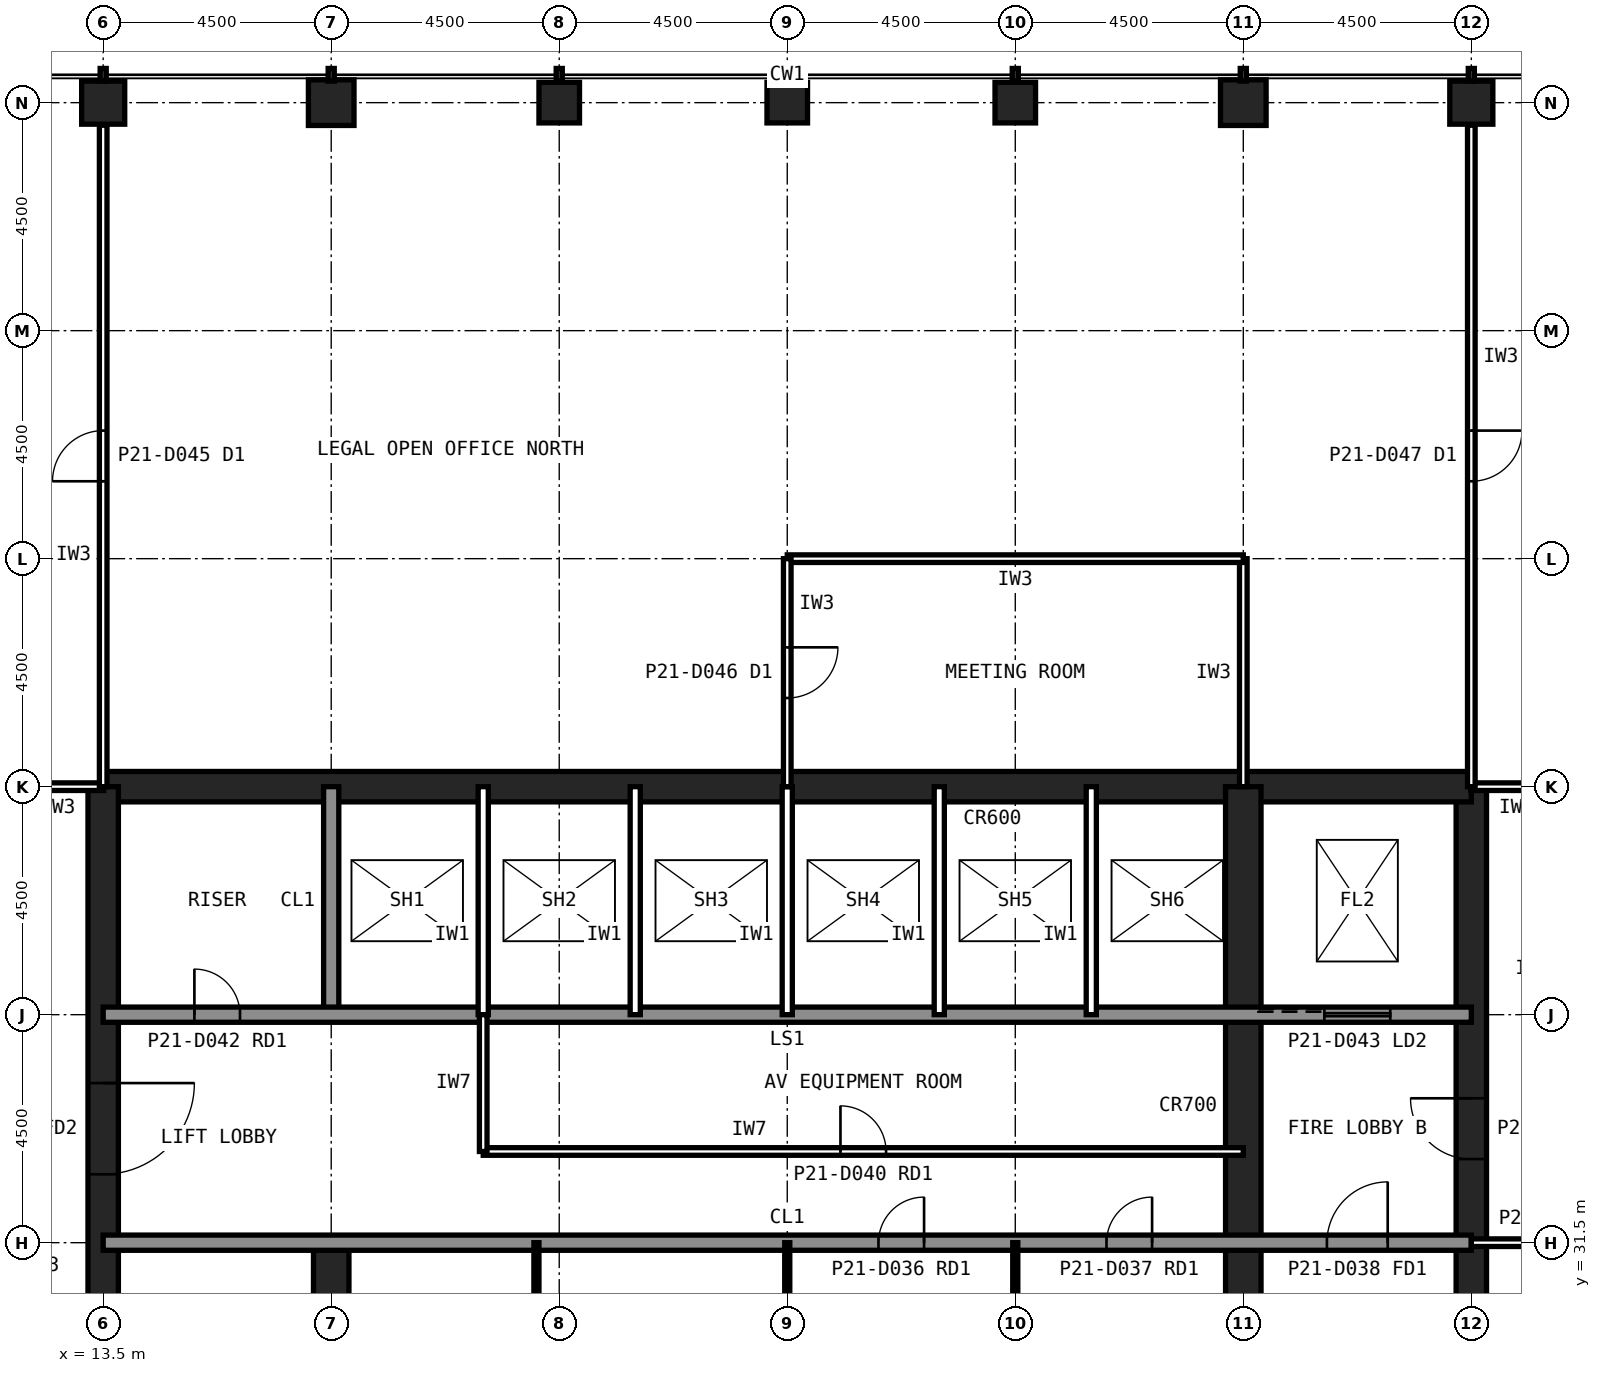
"""IFC4 building model, lengths in metres.
Left out: names, types, materials, properties, quantities, classifications, styles, units other than length and angle.
Written with IfcOpenShell. Run it as: python <this file> out.ifc"""

import sys

from ifc_helpers import new_model, si_unit, direction, frame, frame_2d, origin, origin_2d, place, context, subcontext, project, spatial, rectangle, hollow_rectangle, extrude, element, fill, save


model = new_model("IFC4")
c1 = context("Model", 3, precision=1e-05, world=origin(), true_north=direction((0.0, 1.0)))
c2 = subcontext(c1, "Body", "Model", "MODEL_VIEW")
j1 = project(units=[si_unit("LENGTHUNIT", "METRE"), si_unit("PLANEANGLEUNIT", "RADIAN")], contexts=[c1])
p1 = place(None, origin())
s1 = spatial("IfcSite", under=j1, at=p1, CompositionType="ELEMENT")
p2 = place(p1, origin())
s2 = spatial("IfcBuilding", under=s1, at=p2, CompositionType="ELEMENT")
p3 = place(p2, frame((0.0, 0.0, 87.8)))
s3 = spatial("IfcBuildingStorey", under=s2, at=p3, CompositionType="ELEMENT", Elevation=87.8)
p4 = place(p3, frame((40.5, 54.0, 0.0), z_axis=(0.0, 0.0, 1.0), x_axis=(1.0, 0.0, 0.0)))
e1 = element("IfcColumn", 1, at=p4, inside=s3, PredefinedType="COLUMN", context=c2, shape_type="SweptSolid", body=[
    extrude(hollow_rectangle(XDim=0.85, YDim=0.85, WallThickness=0.05, at=origin_2d()), origin(), (0.0, 0.0, 1.0), 4.2),
])
p5 = place(p3, frame((36.0, 54.0, 0.0), z_axis=(0.0, 0.0, 1.0), x_axis=(1.0, 0.0, 0.0)))
e2 = element("IfcColumn", 2, at=p5, inside=s3, PredefinedType="COLUMN", context=c2, shape_type="SweptSolid", body=[
    extrude(hollow_rectangle(XDim=0.9, YDim=0.9, WallThickness=0.063, at=origin_2d()), origin(), (0.0, 0.0, 1.0), 4.2),
])
for number, where, z_axis, x_axis in (
    (3, (31.5, 54.0, 0.0), (0.0, 0.0, 1.0), (1.0, 0.0, 0.0)),
    (4, (27.0, 54.0, 0.0), (0.0, 0.0, 1.0), (1.0, 0.0, 0.0)),
    (5, (22.5, 54.0, 0.0), (0.0, 0.0, 1.0), (1.0, 0.0, 0.0)),
):
    element("IfcColumn", number, at=place(p3, frame(where, z_axis=z_axis, x_axis=x_axis)), inside=s3, PredefinedType="COLUMN", context=c2, shape_type="SweptSolid", body=[
        extrude(hollow_rectangle(XDim=0.8, YDim=0.8, WallThickness=0.045, at=origin_2d()), origin(), (0.0, 0.0, 1.0), 4.2),
    ])
p6 = place(p3, frame((18.0, 54.0, 0.0), z_axis=(0.0, 0.0, 1.0), x_axis=(1.0, 0.0, 0.0)))
e6 = element("IfcColumn", 6, at=p6, inside=s3, PredefinedType="COLUMN", context=c2, shape_type="SweptSolid", body=[
    extrude(hollow_rectangle(XDim=0.9, YDim=0.9, WallThickness=0.063, at=origin_2d()), origin(), (0.0, 0.0, 1.0), 4.2),
])
p7 = place(p3, frame((13.5, 54.0, 0.0), z_axis=(0.0, 0.0, 1.0), x_axis=(1.0, 0.0, 0.0)))
e7 = element("IfcColumn", 7, at=p7, inside=s3, PredefinedType="COLUMN", context=c2, shape_type="SweptSolid", body=[
    extrude(hollow_rectangle(XDim=0.85, YDim=0.85, WallThickness=0.05, at=origin_2d()), origin(), (0.0, 0.0, 1.0), 4.2),
])
p8 = place(p3, frame((40.5, 13.5, 0.0), z_axis=(0.0, 0.0, 1.0), x_axis=(0.0, 1.0, 0.0)))
e8 = element("IfcWall", 8, at=p8, inside=s3, PredefinedType="SHEAR", context=c2, shape_type="SweptSolid", body=[
    extrude(rectangle(XDim=27.0, YDim=0.6, at=frame_2d((13.5, 0.0))), origin(), (0.0, 0.0, 1.0), 4.2),
])
p9 = place(p8, frame((5.85, 0.0, 0.0)))
e9 = element("IfcOpeningElement", 9, at=p9, cuts=e8, PredefinedType="OPENING", context=c2, shape_type="SweptSolid", body=[
    extrude(rectangle(XDim=1.8, YDim=2.1, at=frame_2d((0.9, 1.05))), frame((0.0, 0.31, 0.0), z_axis=(0.0, -1.0, 0.0), x_axis=(1.0, 0.0, 0.0)), (0.0, 0.0, 1.0), 0.62),
])
p10 = place(p8, frame((19.65, 0.0, 0.0)))
e10 = element("IfcOpeningElement", 10, at=p10, cuts=e8, PredefinedType="OPENING", context=c2, shape_type="SweptSolid", body=[
    extrude(rectangle(XDim=1.2, YDim=2.1, at=frame_2d((0.6, 1.05))), frame((0.0, 0.31, 0.0), z_axis=(0.0, -1.0, 0.0), x_axis=(1.0, 0.0, 0.0)), (0.0, 0.0, 1.0), 0.62),
])
p11 = place(p3, frame((40.5, 40.5, 0.0), z_axis=(0.0, 0.0, 1.0), x_axis=(-1.0, 0.0, 0.0)))
e11 = element("IfcWall", 11, at=p11, inside=s3, PredefinedType="SHEAR", context=c2, shape_type="SweptSolid", body=[
    extrude(rectangle(XDim=27.0, YDim=0.6, at=frame_2d((13.5, 0.0))), origin(), (0.0, 0.0, 1.0), 4.2),
])
p12 = place(p3, frame((13.5, 40.5, 0.0), z_axis=(0.0, 0.0, 1.0), x_axis=(0.0, -1.0, 0.0)))
e12 = element("IfcWall", 12, at=p12, inside=s3, PredefinedType="SHEAR", context=c2, shape_type="SweptSolid", body=[
    extrude(rectangle(XDim=27.0, YDim=0.6, at=frame_2d((13.5, 0.0))), origin(), (0.0, 0.0, 1.0), 4.2),
])
p13 = place(p12, frame((19.65, 0.0, 0.0)))
e13 = element("IfcOpeningElement", 13, at=p13, cuts=e12, PredefinedType="OPENING", context=c2, shape_type="SweptSolid", body=[
    extrude(rectangle(XDim=1.2, YDim=2.1, at=frame_2d((0.6, 1.05))), frame((0.0, 0.31, 0.0), z_axis=(0.0, -1.0, 0.0), x_axis=(1.0, 0.0, 0.0)), (0.0, 0.0, 1.0), 0.62),
])
p14 = place(p12, frame((5.85, 0.0, 0.0)))
e14 = element("IfcOpeningElement", 14, at=p14, cuts=e12, PredefinedType="OPENING", context=c2, shape_type="SweptSolid", body=[
    extrude(rectangle(XDim=1.8, YDim=2.1, at=frame_2d((0.9, 1.05))), frame((0.0, 0.31, 0.0), z_axis=(0.0, -1.0, 0.0), x_axis=(1.0, 0.0, 0.0)), (0.0, 0.0, 1.0), 0.62),
])
p15 = place(p3, frame((18.0, 13.5, 0.0), z_axis=(0.0, 0.0, 1.0), x_axis=(0.0, 1.0, 0.0)))
e15 = element("IfcWall", 15, at=p15, inside=s3, PredefinedType="SHEAR", context=c2, shape_type="SweptSolid", body=[
    extrude(rectangle(XDim=18.0, YDim=0.7, at=frame_2d((9.0, 0.0))), origin(), (0.0, 0.0, 1.0), 4.2),
])
p16 = place(p3, frame((18.0, 36.0, 0.0), z_axis=(0.0, 0.0, 1.0), x_axis=(0.0, 1.0, 0.0)))
e16 = element("IfcWall", 16, at=p16, inside=s3, PredefinedType="SOLIDWALL", context=c2, shape_type="SweptSolid", body=[
    extrude(rectangle(XDim=4.5, YDim=0.3, at=frame_2d((2.25, 0.0))), origin(), (0.0, 0.0, 1.0), 4.04),
])
p17 = place(p3, frame((36.0, 22.5, 0.0), z_axis=(0.0, 0.0, 1.0), x_axis=(0.0, 1.0, 0.0)))
e17 = element("IfcWall", 17, at=p17, inside=s3, PredefinedType="SHEAR", context=c2, shape_type="SweptSolid", body=[
    extrude(rectangle(XDim=18.0, YDim=0.7, at=frame_2d((9.0, 0.0))), origin(), (0.0, 0.0, 1.0), 4.2),
])
p18 = place(p3, frame((13.5, 36.0, 0.0), z_axis=(0.0, 0.0, 1.0), x_axis=(1.0, 0.0, 0.0)))
e18 = element("IfcWall", 18, at=p18, inside=s3, PredefinedType="SOLIDWALL", context=c2, shape_type="SweptSolid", body=[
    extrude(rectangle(XDim=27.0, YDim=0.3, at=frame_2d((13.5, 0.0))), origin(), (0.0, 0.0, 1.0), 4.04),
])
p19 = place(p18, frame((1.8, 0.0, 0.0)))
e19 = element("IfcOpeningElement", 19, at=p19, cuts=e18, PredefinedType="OPENING", context=c2, shape_type="SweptSolid", body=[
    extrude(rectangle(XDim=0.9, YDim=2.1, at=frame_2d((0.45, 1.05))), frame((0.0, 0.16, 0.0), z_axis=(0.0, -1.0, 0.0), x_axis=(1.0, 0.0, 0.0)), (0.0, 0.0, 1.0), 0.32),
])
p20 = place(p18, frame((24.1, 0.0, 0.0)))
e20 = element("IfcOpeningElement", 20, at=p20, cuts=e18, PredefinedType="OPENING", context=c2, shape_type="SweptSolid", body=[
    extrude(rectangle(XDim=1.3, YDim=2.2, at=frame_2d((0.65, 1.1))), frame((0.0, 0.16, 0.0), z_axis=(0.0, -1.0, 0.0), x_axis=(1.0, 0.0, 0.0)), (0.0, 0.0, 1.0), 0.32),
])
p21 = place(p3, frame((13.5, 31.5, 0.0), z_axis=(0.0, 0.0, 1.0), x_axis=(1.0, 0.0, 0.0)))
e21 = element("IfcWall", 21, at=p21, inside=s3, PredefinedType="SOLIDWALL", context=c2, shape_type="SweptSolid", body=[
    extrude(rectangle(XDim=27.0, YDim=0.3, at=frame_2d((13.5, 0.0))), origin(), (0.0, 0.0, 1.0), 4.04),
])
p22 = place(p21, frame((24.15, 0.0, 0.0)))
e22 = element("IfcOpeningElement", 22, at=p22, cuts=e21, PredefinedType="OPENING", context=c2, shape_type="SweptSolid", body=[
    extrude(rectangle(XDim=1.2, YDim=2.1, at=frame_2d((0.6, 1.05))), frame((0.0, 0.16, 0.0), z_axis=(0.0, -1.0, 0.0), x_axis=(1.0, 0.0, 0.0)), (0.0, 0.0, 1.0), 0.32),
])
p23 = place(p21, frame((15.3, 0.0, 0.0)))
e23 = element("IfcOpeningElement", 23, at=p23, cuts=e21, PredefinedType="OPENING", context=c2, shape_type="SweptSolid", body=[
    extrude(rectangle(XDim=0.9, YDim=2.1, at=frame_2d((0.45, 1.05))), frame((0.0, 0.16, 0.0), z_axis=(0.0, -1.0, 0.0), x_axis=(1.0, 0.0, 0.0)), (0.0, 0.0, 1.0), 0.32),
])
p24 = place(p21, frame((19.8, 0.0, 0.0)))
e24 = element("IfcOpeningElement", 24, at=p24, cuts=e21, PredefinedType="OPENING", context=c2, shape_type="SweptSolid", body=[
    extrude(rectangle(XDim=0.9, YDim=2.1, at=frame_2d((0.45, 1.05))), frame((0.0, 0.16, 0.0), z_axis=(0.0, -1.0, 0.0), x_axis=(1.0, 0.0, 0.0)), (0.0, 0.0, 1.0), 0.32),
])
for number, where, z_axis, x_axis in (
    (25, (21.0, 36.0, 0.0), (0.0, 0.0, 1.0), (0.0, 1.0, 0.0)),
    (26, (24.0, 36.0, 0.0), (0.0, 0.0, 1.0), (0.0, 1.0, 0.0)),
    (27, (27.0, 36.0, 0.0), (0.0, 0.0, 1.0), (0.0, 1.0, 0.0)),
    (28, (30.0, 36.0, 0.0), (0.0, 0.0, 1.0), (0.0, 1.0, 0.0)),
    (29, (33.0, 36.0, 0.0), (0.0, 0.0, 1.0), (0.0, 1.0, 0.0)),
):
    element("IfcWall", number, at=place(p3, frame(where, z_axis=z_axis, x_axis=x_axis)), inside=s3, PredefinedType="PARTITIONING", context=c2, shape_type="SweptSolid", body=[
        extrude(rectangle(XDim=4.5, YDim=0.2, at=frame_2d((2.25, 0.0))), origin(), (0.0, 0.0, 1.0), 4.04),
    ])
for number, where, z_axis, x_axis in (
    (30, (22.05, 22.5, 0.0), (0.0, 0.0, 1.0), (0.0, 1.0, 0.0)),
    (31, (27.0, 22.5, 0.0), (0.0, 0.0, 1.0), (0.0, 1.0, 0.0)),
    (32, (31.5, 22.5, 0.0), (0.0, 0.0, 1.0), (0.0, 1.0, 0.0)),
):
    element("IfcWall", number, at=place(p3, frame(where, z_axis=z_axis, x_axis=x_axis)), inside=s3, PredefinedType="PLUMBINGWALL", context=c2, shape_type="SweptSolid", body=[
        extrude(rectangle(XDim=9.0, YDim=0.1, at=frame_2d((4.5, 0.0))), origin(), (0.0, 0.0, 1.0), 4.04),
    ])
p25 = place(p3, frame((18.0, 33.3, 0.0), z_axis=(0.0, 0.0, 1.0), x_axis=(1.0, 0.0, 0.0)))
e33 = element("IfcWall", 33, at=p25, inside=s3, PredefinedType="PARTITIONING", context=c2, shape_type="SweptSolid", body=[
    extrude(rectangle(XDim=12.0, YDim=0.15, at=frame_2d((6.0, 0.0))), origin(), (0.0, 0.0, 1.0), 4.04),
])
p26 = place(p25, frame((2.55, 0.0, 0.0)))
e34 = element("IfcOpeningElement", 34, at=p26, cuts=e33, PredefinedType="OPENING", context=c2, shape_type="SweptSolid", body=[
    extrude(rectangle(XDim=0.9, YDim=2.1, at=frame_2d((0.45, 1.05))), frame((0.0, 0.085, 0.0), z_axis=(0.0, -1.0, 0.0), x_axis=(1.0, 0.0, 0.0)), (0.0, 0.0, 1.0), 0.17),
])
p27 = place(p25, frame((8.55, 0.0, 0.0)))
e35 = element("IfcOpeningElement", 35, at=p27, cuts=e33, PredefinedType="OPENING", context=c2, shape_type="SweptSolid", body=[
    extrude(rectangle(XDim=0.9, YDim=2.1, at=frame_2d((0.45, 1.05))), frame((0.0, 0.085, 0.0), z_axis=(0.0, -1.0, 0.0), x_axis=(1.0, 0.0, 0.0)), (0.0, 0.0, 1.0), 0.17),
])
for number, where, z_axis, x_axis in (
    (36, (18.0, 33.3, 0.0), (0.0, 0.0, 1.0), (0.0, 1.0, 0.0)),
    (37, (24.0, 33.3, 0.0), (0.0, 0.0, 1.0), (0.0, 1.0, 0.0)),
    (38, (30.0, 33.3, 0.0), (0.0, 0.0, 1.0), (0.0, 1.0, 0.0)),
):
    element("IfcWall", number, at=place(p3, frame(where, z_axis=z_axis, x_axis=x_axis)), inside=s3, PredefinedType="PARTITIONING", context=c2, shape_type="SweptSolid", body=[
        extrude(rectangle(XDim=2.7, YDim=0.15, at=frame_2d((1.35, 0.0))), origin(), (0.0, 0.0, 1.0), 4.04),
    ])
for number, where, z_axis, x_axis in (
    (39, (13.51, 40.5, 0.0), (0.0, 0.0, 1.0), (-1.0, 0.0, 0.0)),
    (40, (42.3, 40.5, 0.0), (0.0, 0.0, 1.0), (-1.0, 0.0, 0.0)),
):
    element("IfcWall", number, at=place(p3, frame(where, z_axis=z_axis, x_axis=x_axis)), inside=s3, PredefinedType="PARTITIONING", context=c2, shape_type="SweptSolid", body=[
        extrude(rectangle(XDim=1.81, YDim=0.15, at=frame_2d((0.905, 0.0))), origin(), (0.0, 0.0, 1.0), 3.189),
    ])
p28 = place(p3, frame((44.1, 31.5, 0.0), z_axis=(0.0, 0.0, 1.0), x_axis=(-1.0, 0.0, 0.0)))
e41 = element("IfcWall", 41, at=p28, inside=s3, PredefinedType="PARTITIONING", context=c2, shape_type="SweptSolid", body=[
    extrude(rectangle(XDim=3.6, YDim=0.15, at=frame_2d((1.8, 0.0))), origin(), (0.0, 0.0, 1.0), 3.189),
])
p29 = place(p28, frame((1.3, 0.0, 0.0)))
e42 = element("IfcOpeningElement", 42, at=p29, cuts=e41, PredefinedType="OPENING", context=c2, shape_type="SweptSolid", body=[
    extrude(rectangle(XDim=1.0, YDim=2.1, at=frame_2d((0.5, 1.05))), frame((0.0, 0.085, 0.0), z_axis=(0.0, -1.0, 0.0), x_axis=(1.0, 0.0, 0.0)), (0.0, 0.0, 1.0), 0.17),
])
p30 = place(p3, frame((36.0, 40.5, 0.0), z_axis=(0.0, 0.0, 1.0), x_axis=(0.0, 1.0, 0.0)))
e43 = element("IfcWall", 43, at=p30, inside=s3, PredefinedType="PARTITIONING", context=c2, shape_type="SweptSolid", body=[
    extrude(rectangle(XDim=4.5, YDim=0.15, at=frame_2d((2.25, 0.0))), origin(), (0.0, 0.0, 1.0), 3.189),
])
p31 = place(p3, frame((36.0, 45.0, 0.0), z_axis=(0.0, 0.0, 1.0), x_axis=(-1.0, 0.0, 0.0)))
e44 = element("IfcWall", 44, at=p31, inside=s3, PredefinedType="PARTITIONING", context=c2, shape_type="SweptSolid", body=[
    extrude(rectangle(XDim=9.0, YDim=0.15, at=frame_2d((4.5, 0.0))), origin(), (0.0, 0.0, 1.0), 4.04),
])
p32 = place(p3, frame((27.0, 45.0, 0.0), z_axis=(0.0, 0.0, 1.0), x_axis=(0.0, -1.0, 0.0)))
e45 = element("IfcWall", 45, at=p32, inside=s3, PredefinedType="PARTITIONING", context=c2, shape_type="SweptSolid", body=[
    extrude(rectangle(XDim=4.5, YDim=0.15, at=frame_2d((2.25, 0.0))), origin(), (0.0, 0.0, 1.0), 3.189),
])
p33 = place(p32, frame((1.75, 0.0, 0.0)))
e46 = element("IfcOpeningElement", 46, at=p33, cuts=e45, PredefinedType="OPENING", context=c2, shape_type="SweptSolid", body=[
    extrude(rectangle(XDim=1.0, YDim=2.1, at=frame_2d((0.5, 1.05))), frame((0.0, 0.085, 0.0), z_axis=(0.0, -1.0, 0.0), x_axis=(1.0, 0.0, 0.0)), (0.0, 0.0, 1.0), 0.17),
])
p34 = place(p3, frame((40.5, 53.555, 0.0), z_axis=(0.0, 0.0, 1.0), x_axis=(0.0, -1.0, 0.0)))
e47 = element("IfcWall", 47, at=p34, inside=s3, PredefinedType="PARTITIONING", context=c2, shape_type="SweptSolid", body=[
    extrude(rectangle(XDim=13.055, YDim=0.15, at=frame_2d((6.527, 0.0))), origin(), (0.0, 0.0, 1.0), 3.189),
])
p35 = place(p34, frame((6.028, 0.0, 0.0)))
e48 = element("IfcOpeningElement", 48, at=p35, cuts=e47, PredefinedType="OPENING", context=c2, shape_type="SweptSolid", body=[
    extrude(rectangle(XDim=1.0, YDim=2.1, at=frame_2d((0.5, 1.05))), frame((0.0, 0.085, 0.0), z_axis=(0.0, -1.0, 0.0), x_axis=(1.0, 0.0, 0.0)), (0.0, 0.0, 1.0), 0.17),
])
p36 = place(p3, frame((13.5, 40.5, 0.0), z_axis=(0.0, 0.0, 1.0), x_axis=(0.0, 1.0, 0.0)))
e49 = element("IfcWall", 49, at=p36, inside=s3, PredefinedType="PARTITIONING", context=c2, shape_type="SweptSolid", body=[
    extrude(rectangle(XDim=13.055, YDim=0.15, at=frame_2d((6.527, 0.0))), origin(), (0.0, 0.0, 1.0), 3.189),
])
p37 = place(p36, frame((6.028, 0.0, 0.0)))
e50 = element("IfcOpeningElement", 50, at=p37, cuts=e49, PredefinedType="OPENING", context=c2, shape_type="SweptSolid", body=[
    extrude(rectangle(XDim=1.0, YDim=2.1, at=frame_2d((0.5, 1.05))), frame((0.0, 0.085, 0.0), z_axis=(0.0, -1.0, 0.0), x_axis=(1.0, 0.0, 0.0)), (0.0, 0.0, 1.0), 0.17),
])
p38 = place(p14, origin())
e51 = element("IfcDoor", 51, at=p38, inside=s3, OperationType="SINGLE_SWING_LEFT", PredefinedType="DOOR", context=c2, shape_type="SweptSolid", body=[
    extrude(rectangle(XDim=1.8, YDim=2.1, at=frame_2d((0.9, 1.05))), frame((0.0, 0.025, 0.0), z_axis=(0.0, -1.0, 0.0), x_axis=(1.0, 0.0, 0.0)), (0.0, 0.0, 1.0), 0.05),
])
fill(e14, e51)
p39 = place(p10, origin())
e52 = element("IfcDoor", 52, at=p39, inside=s3, OperationType="SINGLE_SWING_RIGHT", PredefinedType="DOOR", context=c2, shape_type="SweptSolid", body=[
    extrude(rectangle(XDim=1.2, YDim=2.1, at=frame_2d((0.6, 1.05))), frame((0.0, 0.025, 0.0), z_axis=(0.0, -1.0, 0.0), x_axis=(1.0, 0.0, 0.0)), (0.0, 0.0, 1.0), 0.05),
])
fill(e10, e52)
p40 = place(p22, origin())
e53 = element("IfcDoor", 53, at=p40, inside=s3, OperationType="SINGLE_SWING_RIGHT", PredefinedType="DOOR", context=c2, shape_type="SweptSolid", body=[
    extrude(rectangle(XDim=1.2, YDim=2.1, at=frame_2d((0.6, 1.05))), frame((0.0, 0.025, 0.0), z_axis=(0.0, -1.0, 0.0), x_axis=(1.0, 0.0, 0.0)), (0.0, 0.0, 1.0), 0.05),
])
fill(e22, e53)
p41 = place(p23, origin())
e54 = element("IfcDoor", 54, at=p41, inside=s3, OperationType="SINGLE_SWING_RIGHT", PredefinedType="DOOR", context=c2, shape_type="SweptSolid", body=[
    extrude(rectangle(XDim=0.9, YDim=2.1, at=frame_2d((0.45, 1.05))), frame((0.0, 0.025, 0.0), z_axis=(0.0, -1.0, 0.0), x_axis=(1.0, 0.0, 0.0)), (0.0, 0.0, 1.0), 0.05),
])
fill(e23, e54)
p42 = place(p24, origin())
e55 = element("IfcDoor", 55, at=p42, inside=s3, OperationType="SINGLE_SWING_RIGHT", PredefinedType="DOOR", context=c2, shape_type="SweptSolid", body=[
    extrude(rectangle(XDim=0.9, YDim=2.1, at=frame_2d((0.45, 1.05))), frame((0.0, 0.025, 0.0), z_axis=(0.0, -1.0, 0.0), x_axis=(1.0, 0.0, 0.0)), (0.0, 0.0, 1.0), 0.05),
])
fill(e24, e55)
p43 = place(p19, origin())
e56 = element("IfcDoor", 56, at=p43, inside=s3, OperationType="SINGLE_SWING_LEFT", PredefinedType="DOOR", context=c2, shape_type="SweptSolid", body=[
    extrude(rectangle(XDim=0.9, YDim=2.1, at=frame_2d((0.45, 1.05))), frame((0.0, 0.025, 0.0), z_axis=(0.0, -1.0, 0.0), x_axis=(1.0, 0.0, 0.0)), (0.0, 0.0, 1.0), 0.05),
])
fill(e19, e56)
p44 = place(p26, origin())
e57 = element("IfcDoor", 57, at=p44, inside=s3, OperationType="SINGLE_SWING_LEFT", PredefinedType="DOOR", context=c2, shape_type="SweptSolid", body=[
    extrude(rectangle(XDim=0.9, YDim=2.1, at=frame_2d((0.45, 1.05))), frame((0.0, 0.025, 0.0), z_axis=(0.0, -1.0, 0.0), x_axis=(1.0, 0.0, 0.0)), (0.0, 0.0, 1.0), 0.05),
])
fill(e34, e57)
p45 = place(p27, origin())
e58 = element("IfcDoor", 58, at=p45, inside=s3, OperationType="SINGLE_SWING_RIGHT", PredefinedType="DOOR", context=c2, shape_type="SweptSolid", body=[
    extrude(rectangle(XDim=0.9, YDim=2.1, at=frame_2d((0.45, 1.05))), frame((0.0, 0.025, 0.0), z_axis=(0.0, -1.0, 0.0), x_axis=(1.0, 0.0, 0.0)), (0.0, 0.0, 1.0), 0.05),
])
fill(e35, e58)
p46 = place(p20, origin())
e59 = element("IfcDoor", 59, at=p46, inside=s3, OperationType="SLIDING_TO_LEFT", PredefinedType="DOOR", context=c2, shape_type="SweptSolid", body=[
    extrude(rectangle(XDim=1.3, YDim=2.2, at=frame_2d((0.65, 1.1))), frame((0.0, 0.025, 0.0), z_axis=(0.0, -1.0, 0.0), x_axis=(1.0, 0.0, 0.0)), (0.0, 0.0, 1.0), 0.05),
])
fill(e20, e59)
p47 = place(p33, origin())
e60 = element("IfcDoor", 60, at=p47, inside=s3, OperationType="SINGLE_SWING_LEFT", PredefinedType="DOOR", context=c2, shape_type="SweptSolid", body=[
    extrude(rectangle(XDim=1.0, YDim=2.1, at=frame_2d((0.5, 1.05))), frame((0.0, 0.025, 0.0), z_axis=(0.0, -1.0, 0.0), x_axis=(1.0, 0.0, 0.0)), (0.0, 0.0, 1.0), 0.05),
])
fill(e46, e60)
p48 = place(p35, origin())
e61 = element("IfcDoor", 61, at=p48, inside=s3, OperationType="SINGLE_SWING_LEFT", PredefinedType="DOOR", context=c2, shape_type="SweptSolid", body=[
    extrude(rectangle(XDim=1.0, YDim=2.1, at=frame_2d((0.5, 1.05))), frame((0.0, 0.025, 0.0), z_axis=(0.0, -1.0, 0.0), x_axis=(1.0, 0.0, 0.0)), (0.0, 0.0, 1.0), 0.05),
])
fill(e48, e61)
p49 = place(p37, origin())
e62 = element("IfcDoor", 62, at=p49, inside=s3, OperationType="SINGLE_SWING_LEFT", PredefinedType="DOOR", context=c2, shape_type="SweptSolid", body=[
    extrude(rectangle(XDim=1.0, YDim=2.1, at=frame_2d((0.5, 1.05))), frame((0.0, 0.025, 0.0), z_axis=(0.0, -1.0, 0.0), x_axis=(1.0, 0.0, 0.0)), (0.0, 0.0, 1.0), 0.05),
])
fill(e50, e62)
save(model, sys.argv[1])
